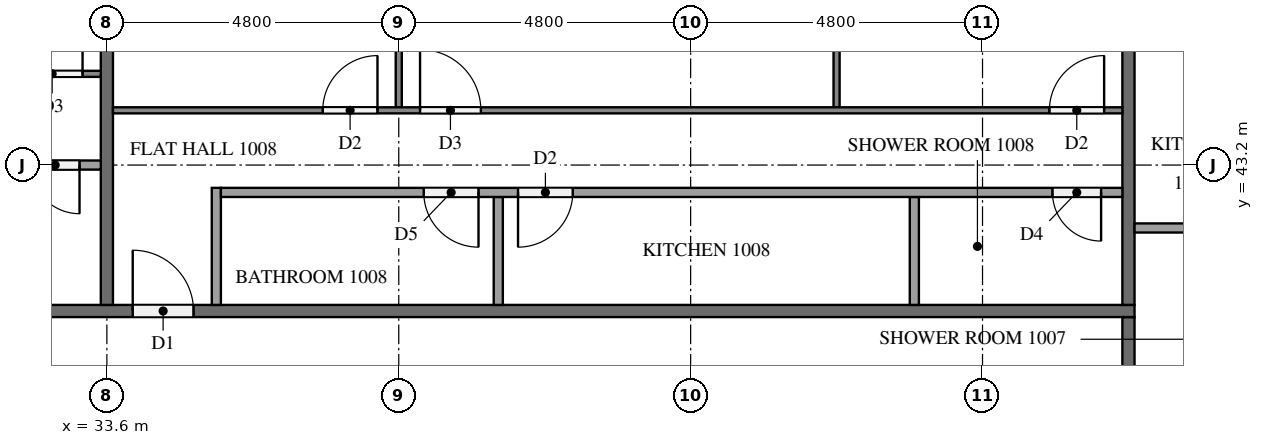
"""IFC4 building model, lengths in metres.
Left out: names, types, materials, properties, quantities, classifications, styles, units other than length and angle.
Written with IfcOpenShell. Run it as: python <this file> out.ifc"""

import sys

from ifc_helpers import new_model, si_unit, direction, frame, frame_2d, origin, place, context, subcontext, project, spatial, rectangle, extrude, element, fill, save


model = new_model("IFC4")
c1 = context("Model", 3, precision=1e-05, world=origin(), true_north=direction((0.0, 1.0)))
c2 = subcontext(c1, "Body", "Model", "MODEL_VIEW")
j1 = project(units=[si_unit("LENGTHUNIT", "METRE"), si_unit("PLANEANGLEUNIT", "RADIAN")], contexts=[c1])
p1 = place(None, origin())
s1 = spatial("IfcSite", under=j1, at=p1, CompositionType="ELEMENT")
p2 = place(p1, origin())
s2 = spatial("IfcBuilding", under=s1, at=p2, CompositionType="ELEMENT")
p3 = place(p2, frame((0.0, 0.0, 43.4)))
s3 = spatial("IfcBuildingStorey", under=s2, at=p3, CompositionType="ELEMENT", Elevation=43.4)
p4 = place(p3, frame((50.4, 40.7, 0.0), z_axis=(0.0, 0.0, 1.0), x_axis=(0.0, -1.0, 0.0)))
e1 = element("IfcWall", 1, at=p4, inside=s3, PredefinedType="PARTITIONING", context=c2, shape_type="SweptSolid", body=[
    extrude(rectangle(XDim=28.6, YDim=0.2, at=frame_2d((14.3, 0.0))), origin(), (0.0, 0.0, 1.0), 3.2),
])
p5 = place(p4, frame((17.125, 0.0, 0.0)))
e2 = element("IfcOpeningElement", 2, at=p5, cuts=e1, PredefinedType="OPENING", context=c2, shape_type="SweptSolid", body=[
    extrude(rectangle(XDim=1.0, YDim=2.1, at=frame_2d((0.5, 1.05))), frame((0.0, 0.11, 0.0), z_axis=(0.0, -1.0, 0.0), x_axis=(1.0, 0.0, 0.0)), (0.0, 0.0, 1.0), 0.22),
])
p6 = place(p4, frame((15.275, 0.0, 0.0)))
e3 = element("IfcOpeningElement", 3, at=p6, cuts=e1, PredefinedType="OPENING", context=c2, shape_type="SweptSolid", body=[
    extrude(rectangle(XDim=1.0, YDim=2.1, at=frame_2d((0.5, 1.05))), frame((0.0, 0.11, 0.0), z_axis=(0.0, -1.0, 0.0), x_axis=(1.0, 0.0, 0.0)), (0.0, 0.0, 1.0), 0.22),
])
p7 = place(p4, frame((5.675, 0.0, 0.0)))
e4 = element("IfcOpeningElement", 4, at=p7, cuts=e1, PredefinedType="OPENING", context=c2, shape_type="SweptSolid", body=[
    extrude(rectangle(XDim=1.0, YDim=2.1, at=frame_2d((0.5, 1.05))), frame((0.0, 0.11, 0.0), z_axis=(0.0, -1.0, 0.0), x_axis=(1.0, 0.0, 0.0)), (0.0, 0.0, 1.0), 0.22),
])
p8 = place(p3, frame((11.9, 40.8, 0.0), z_axis=(0.0, 0.0, 1.0), x_axis=(1.0, 0.0, 0.0)))
e5 = element("IfcWall", 5, at=p8, inside=s3, PredefinedType="PARTITIONING", context=c2, shape_type="SweptSolid", body=[
    extrude(rectangle(XDim=38.6, YDim=0.2, at=frame_2d((19.3, 0.0))), origin(), (0.0, 0.0, 1.0), 3.2),
])
p9 = place(p8, frame((22.125, 0.0, 0.0)))
e6 = element("IfcOpeningElement", 6, at=p9, cuts=e5, PredefinedType="OPENING", context=c2, shape_type="SweptSolid", body=[
    extrude(rectangle(XDim=1.0, YDim=2.1, at=frame_2d((0.5, 1.05))), frame((0.0, 0.11, 0.0), z_axis=(0.0, -1.0, 0.0), x_axis=(1.0, 0.0, 0.0)), (0.0, 0.0, 1.0), 0.22),
])
p10 = place(p8, frame((10.125, 0.0, 0.0)))
e7 = element("IfcOpeningElement", 7, at=p10, cuts=e5, PredefinedType="OPENING", context=c2, shape_type="SweptSolid", body=[
    extrude(rectangle(XDim=1.0, YDim=2.1, at=frame_2d((0.5, 1.05))), frame((0.0, 0.11, 0.0), z_axis=(0.0, -1.0, 0.0), x_axis=(1.0, 0.0, 0.0)), (0.0, 0.0, 1.0), 0.22),
])
p11 = place(p8, frame((8.275, 0.0, 0.0)))
e8 = element("IfcOpeningElement", 8, at=p11, cuts=e5, PredefinedType="OPENING", context=c2, shape_type="SweptSolid", body=[
    extrude(rectangle(XDim=1.0, YDim=2.1, at=frame_2d((0.5, 1.05))), frame((0.0, 0.11, 0.0), z_axis=(0.0, -1.0, 0.0), x_axis=(1.0, 0.0, 0.0)), (0.0, 0.0, 1.0), 0.22),
])
p12 = place(p3, frame((50.4, 40.9, 0.0), z_axis=(0.0, 0.0, 1.0), x_axis=(0.0, 1.0, 0.0)))
e9 = element("IfcWall", 9, at=p12, inside=s3, PredefinedType="PARTITIONING", context=c2, shape_type="SweptSolid", body=[
    extrude(rectangle(XDim=7.0, YDim=0.2, at=frame_2d((3.5, 0.0))), origin(), (0.0, 0.0, 1.0), 3.2),
])
p13 = place(p3, frame((33.6, 47.55, 0.0), z_axis=(0.0, 0.0, 1.0), x_axis=(0.0, -1.0, 0.0)))
e10 = element("IfcWall", 10, at=p13, inside=s3, PredefinedType="PARTITIONING", context=c2, shape_type="SweptSolid", body=[
    extrude(rectangle(XDim=6.65, YDim=0.2, at=frame_2d((3.325, 0.0))), origin(), (0.0, 0.0, 1.0), 3.2),
])
p14 = place(p3, frame((50.5, 42.165, 0.0), z_axis=(0.0, 0.0, 1.0), x_axis=(1.0, 0.0, 0.0)))
e11 = element("IfcWall", 11, at=p14, inside=s3, PredefinedType="PARTITIONING", context=c2, shape_type="SweptSolid", body=[
    extrude(rectangle(XDim=1.925, YDim=0.15, at=frame_2d((0.962, 0.0))), origin(), (0.0, 0.0, 1.0), 3.2),
])
for number, where, z_axis, x_axis in (
    (12, (38.4, 44.15, 0.0), (0.0, 0.0, 1.0), (0.0, 1.0, 0.0)),
    (13, (45.6, 44.15, 0.0), (0.0, 0.0, 1.0), (0.0, 1.0, 0.0)),
):
    element("IfcWall", number, at=place(p3, frame(where, z_axis=z_axis, x_axis=x_axis)), inside=s3, PredefinedType="PARTITIONING", context=c2, shape_type="SweptSolid", body=[
        extrude(rectangle(XDim=3.75, YDim=0.1, at=frame_2d((1.875, 0.0))), origin(), (0.0, 0.0, 1.0), 3.2),
    ])
p15 = place(p3, frame((33.7, 44.1, 0.0), z_axis=(0.0, 0.0, 1.0), x_axis=(1.0, 0.0, 0.0)))
e14 = element("IfcWall", 14, at=p15, inside=s3, PredefinedType="PARTITIONING", context=c2, shape_type="SweptSolid", body=[
    extrude(rectangle(XDim=16.6, YDim=0.1, at=frame_2d((8.3, 0.0))), origin(), (0.0, 0.0, 1.0), 3.2),
])
p16 = place(p15, frame((3.45, 0.0, 0.0)))
e15 = element("IfcOpeningElement", 15, at=p16, cuts=e14, PredefinedType="OPENING", context=c2, shape_type="SweptSolid", body=[
    extrude(rectangle(XDim=0.9, YDim=2.1, at=frame_2d((0.45, 1.05))), frame((0.0, 0.06, 0.0), z_axis=(0.0, -1.0, 0.0), x_axis=(1.0, 0.0, 0.0)), (0.0, 0.0, 1.0), 0.12),
])
p17 = place(p15, frame((5.05, 0.0, 0.0)))
e16 = element("IfcOpeningElement", 16, at=p17, cuts=e14, PredefinedType="OPENING", context=c2, shape_type="SweptSolid", body=[
    extrude(rectangle(XDim=1.0, YDim=2.1, at=frame_2d((0.5, 1.05))), frame((0.0, 0.06, 0.0), z_axis=(0.0, -1.0, 0.0), x_axis=(1.0, 0.0, 0.0)), (0.0, 0.0, 1.0), 0.12),
])
p18 = place(p15, frame((15.4, 0.0, 0.0)))
e17 = element("IfcOpeningElement", 17, at=p18, cuts=e14, PredefinedType="OPENING", context=c2, shape_type="SweptSolid", body=[
    extrude(rectangle(XDim=0.9, YDim=2.1, at=frame_2d((0.45, 1.05))), frame((0.0, 0.06, 0.0), z_axis=(0.0, -1.0, 0.0), x_axis=(1.0, 0.0, 0.0)), (0.0, 0.0, 1.0), 0.12),
])
for number, where, z_axis, x_axis in (
    (18, (40.037, 40.9, 0.0), (0.0, 0.0, 1.0), (0.0, 1.0, 0.0)),
    (19, (46.879, 40.9, 0.0), (0.0, 0.0, 1.0), (0.0, 1.0, 0.0)),
):
    element("IfcWall", number, at=place(p3, frame(where, z_axis=z_axis, x_axis=x_axis)), inside=s3, PredefinedType="PARTITIONING", context=c2, shape_type="SweptSolid", body=[
        extrude(rectangle(XDim=1.775, YDim=0.15, at=frame_2d((0.888, 0.0))), origin(), (0.0, 0.0, 1.0), 3.2),
    ])
p19 = place(p3, frame((35.4, 40.9, 0.0), z_axis=(0.0, 0.0, 1.0), x_axis=(0.0, 1.0, 0.0)))
e20 = element("IfcWall", 20, at=p19, inside=s3, PredefinedType="PARTITIONING", context=c2, shape_type="SweptSolid", body=[
    extrude(rectangle(XDim=1.925, YDim=0.15, at=frame_2d((0.962, 0.0))), origin(), (0.0, 0.0, 1.0), 3.2),
])
p20 = place(p3, frame((50.3, 42.75, 0.0), z_axis=(0.0, 0.0, 1.0), x_axis=(-1.0, 0.0, 0.0)))
e21 = element("IfcWall", 21, at=p20, inside=s3, PredefinedType="PARTITIONING", context=c2, shape_type="SweptSolid", body=[
    extrude(rectangle(XDim=14.825, YDim=0.15, at=frame_2d((7.413, 0.0))), origin(), (0.0, 0.0, 1.0), 3.2),
])
p21 = place(p20, frame((10.588, 0.0, 0.0)))
e22 = element("IfcOpeningElement", 22, at=p21, cuts=e21, PredefinedType="OPENING", context=c2, shape_type="SweptSolid", body=[
    extrude(rectangle(XDim=0.9, YDim=2.1, at=frame_2d((0.45, 1.05))), frame((0.0, 0.085, 0.0), z_axis=(0.0, -1.0, 0.0), x_axis=(1.0, 0.0, 0.0)), (0.0, 0.0, 1.0), 0.17),
])
p22 = place(p20, frame((9.039, 0.0, 0.0)))
e23 = element("IfcOpeningElement", 23, at=p22, cuts=e21, PredefinedType="OPENING", context=c2, shape_type="SweptSolid", body=[
    extrude(rectangle(XDim=0.9, YDim=2.1, at=frame_2d((0.45, 1.05))), frame((0.0, 0.085, 0.0), z_axis=(0.0, -1.0, 0.0), x_axis=(1.0, 0.0, 0.0)), (0.0, 0.0, 1.0), 0.17),
])
p23 = place(p20, frame((0.35, 0.0, 0.0)))
e24 = element("IfcOpeningElement", 24, at=p23, cuts=e21, PredefinedType="OPENING", context=c2, shape_type="SweptSolid", body=[
    extrude(rectangle(XDim=0.8, YDim=2.1, at=frame_2d((0.4, 1.05))), frame((0.0, 0.085, 0.0), z_axis=(0.0, -1.0, 0.0), x_axis=(1.0, 0.0, 0.0)), (0.0, 0.0, 1.0), 0.17),
])
p24 = place(p3, frame((21.7, 44.7, 0.0), z_axis=(0.0, 0.0, 1.0), x_axis=(1.0, 0.0, 0.0)))
e25 = element("IfcWall", 25, at=p24, inside=s3, PredefinedType="PARTITIONING", context=c2, shape_type="SweptSolid", body=[
    extrude(rectangle(XDim=11.8, YDim=0.1, at=frame_2d((5.9, 0.0))), origin(), (0.0, 0.0, 1.0), 3.2),
])
p25 = place(p24, frame((0.3, 0.0, 0.0)))
e26 = element("IfcOpeningElement", 26, at=p25, cuts=e25, PredefinedType="OPENING", context=c2, shape_type="SweptSolid", body=[
    extrude(rectangle(XDim=0.9, YDim=2.1, at=frame_2d((0.45, 1.05))), frame((0.0, 0.06, 0.0), z_axis=(0.0, -1.0, 0.0), x_axis=(1.0, 0.0, 0.0)), (0.0, 0.0, 1.0), 0.12),
])
p26 = place(p24, frame((10.5, 0.0, 0.0)))
e27 = element("IfcOpeningElement", 27, at=p26, cuts=e25, PredefinedType="OPENING", context=c2, shape_type="SweptSolid", body=[
    extrude(rectangle(XDim=1.0, YDim=2.1, at=frame_2d((0.5, 1.05))), frame((0.0, 0.06, 0.0), z_axis=(0.0, -1.0, 0.0), x_axis=(1.0, 0.0, 0.0)), (0.0, 0.0, 1.0), 0.12),
])
p27 = place(p3, frame((33.5, 43.2, 0.0), z_axis=(0.0, 0.0, 1.0), x_axis=(-1.0, 0.0, 0.0)))
e28 = element("IfcWall", 28, at=p27, inside=s3, PredefinedType="PARTITIONING", context=c2, shape_type="SweptSolid", body=[
    extrude(rectangle(XDim=10.025, YDim=0.15, at=frame_2d((5.012, 0.0))), origin(), (0.0, 0.0, 1.0), 3.2),
])
p28 = place(p27, frame((8.825, 0.0, 0.0)))
e29 = element("IfcOpeningElement", 29, at=p28, cuts=e28, PredefinedType="OPENING", context=c2, shape_type="SweptSolid", body=[
    extrude(rectangle(XDim=0.9, YDim=2.1, at=frame_2d((0.45, 1.05))), frame((0.0, 0.085, 0.0), z_axis=(0.0, -1.0, 0.0), x_axis=(1.0, 0.0, 0.0)), (0.0, 0.0, 1.0), 0.17),
])
p29 = place(p27, frame((0.35, 0.0, 0.0)))
e30 = element("IfcOpeningElement", 30, at=p29, cuts=e28, PredefinedType="OPENING", context=c2, shape_type="SweptSolid", body=[
    extrude(rectangle(XDim=0.8, YDim=2.1, at=frame_2d((0.4, 1.05))), frame((0.0, 0.085, 0.0), z_axis=(0.0, -1.0, 0.0), x_axis=(1.0, 0.0, 0.0)), (0.0, 0.0, 1.0), 0.17),
])
p30 = place(p9, origin())
e31 = element("IfcDoor", 31, at=p30, inside=s3, OperationType="SINGLE_SWING_LEFT", PredefinedType="DOOR", context=c2, shape_type="SweptSolid", body=[
    extrude(rectangle(XDim=1.0, YDim=2.1, at=frame_2d((0.5, 1.05))), frame((0.0, 0.025, 0.0), z_axis=(0.0, -1.0, 0.0), x_axis=(1.0, 0.0, 0.0)), (0.0, 0.0, 1.0), 0.05),
])
fill(e6, e31)
p31 = place(p16, origin())
e32 = element("IfcDoor", 32, at=p31, inside=s3, OperationType="SINGLE_SWING_RIGHT", PredefinedType="DOOR", context=c2, shape_type="SweptSolid", body=[
    extrude(rectangle(XDim=0.9, YDim=2.1, at=frame_2d((0.45, 1.05))), frame((0.0, 0.025, 0.0), z_axis=(0.0, -1.0, 0.0), x_axis=(1.0, 0.0, 0.0)), (0.0, 0.0, 1.0), 0.05),
])
fill(e15, e32)
p32 = place(p17, origin())
e33 = element("IfcDoor", 33, at=p32, inside=s3, OperationType="SINGLE_SWING_LEFT", PredefinedType="DOOR", context=c2, shape_type="SweptSolid", body=[
    extrude(rectangle(XDim=1.0, YDim=2.1, at=frame_2d((0.5, 1.05))), frame((0.0, 0.025, 0.0), z_axis=(0.0, -1.0, 0.0), x_axis=(1.0, 0.0, 0.0)), (0.0, 0.0, 1.0), 0.05),
])
fill(e16, e33)
p33 = place(p18, origin())
e34 = element("IfcDoor", 34, at=p33, inside=s3, OperationType="SINGLE_SWING_RIGHT", PredefinedType="DOOR", context=c2, shape_type="SweptSolid", body=[
    extrude(rectangle(XDim=0.9, YDim=2.1, at=frame_2d((0.45, 1.05))), frame((0.0, 0.025, 0.0), z_axis=(0.0, -1.0, 0.0), x_axis=(1.0, 0.0, 0.0)), (0.0, 0.0, 1.0), 0.05),
])
fill(e17, e34)
p34 = place(p21, origin())
e35 = element("IfcDoor", 35, at=p34, inside=s3, OperationType="SINGLE_SWING_LEFT", PredefinedType="DOOR", context=c2, shape_type="SweptSolid", body=[
    extrude(rectangle(XDim=0.9, YDim=2.1, at=frame_2d((0.45, 1.05))), frame((0.0, 0.025, 0.0), z_axis=(0.0, -1.0, 0.0), x_axis=(1.0, 0.0, 0.0)), (0.0, 0.0, 1.0), 0.05),
])
fill(e22, e35)
p35 = place(p22, origin())
e36 = element("IfcDoor", 36, at=p35, inside=s3, OperationType="SINGLE_SWING_RIGHT", PredefinedType="DOOR", context=c2, shape_type="SweptSolid", body=[
    extrude(rectangle(XDim=0.9, YDim=2.1, at=frame_2d((0.45, 1.05))), frame((0.0, 0.025, 0.0), z_axis=(0.0, -1.0, 0.0), x_axis=(1.0, 0.0, 0.0)), (0.0, 0.0, 1.0), 0.05),
])
fill(e23, e36)
p36 = place(p23, origin())
e37 = element("IfcDoor", 37, at=p36, inside=s3, OperationType="SINGLE_SWING_LEFT", PredefinedType="DOOR", context=c2, shape_type="SweptSolid", body=[
    extrude(rectangle(XDim=0.8, YDim=2.1, at=frame_2d((0.4, 1.05))), frame((0.0, 0.025, 0.0), z_axis=(0.0, -1.0, 0.0), x_axis=(1.0, 0.0, 0.0)), (0.0, 0.0, 1.0), 0.05),
])
fill(e24, e37)
p37 = place(p26, origin())
e38 = element("IfcDoor", 38, at=p37, inside=s3, OperationType="SINGLE_SWING_RIGHT", PredefinedType="DOOR", context=c2, shape_type="SweptSolid", body=[
    extrude(rectangle(XDim=1.0, YDim=2.1, at=frame_2d((0.5, 1.05))), frame((0.0, 0.025, 0.0), z_axis=(0.0, -1.0, 0.0), x_axis=(1.0, 0.0, 0.0)), (0.0, 0.0, 1.0), 0.05),
])
fill(e27, e38)
p38 = place(p29, origin())
e39 = element("IfcDoor", 39, at=p38, inside=s3, OperationType="SINGLE_SWING_LEFT", PredefinedType="DOOR", context=c2, shape_type="SweptSolid", body=[
    extrude(rectangle(XDim=0.8, YDim=2.1, at=frame_2d((0.4, 1.05))), frame((0.0, 0.025, 0.0), z_axis=(0.0, -1.0, 0.0), x_axis=(1.0, 0.0, 0.0)), (0.0, 0.0, 1.0), 0.05),
])
fill(e30, e39)
save(model, sys.argv[1])
